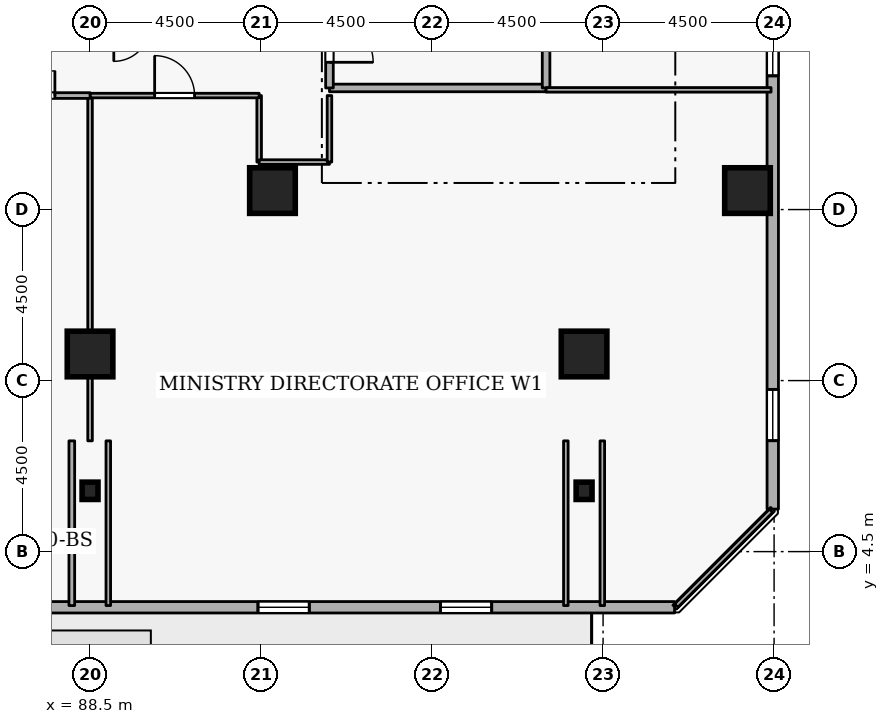
"""IFC4 building model, lengths in metres.
Left out: names, types, materials, properties, quantities, classifications, styles, units other than length and angle.
Written with IfcOpenShell. Run it as: python <this file> out.ifc"""

import sys

from ifc_helpers import new_model, si_unit, direction, frame, frame_2d, origin, origin_2d, place, context, subcontext, project, spatial, rectangle, i_section, extrude, element, fill, save


model = new_model("IFC4")
c1 = context("Model", 3, precision=1e-05, world=origin(), true_north=direction((0.0, 1.0)))
c2 = subcontext(c1, "Body", "Model", "MODEL_VIEW")
j1 = project(units=[si_unit("LENGTHUNIT", "METRE"), si_unit("PLANEANGLEUNIT", "RADIAN")], contexts=[c1])
p1 = place(None, origin())
s1 = spatial("IfcSite", under=j1, at=p1, CompositionType="ELEMENT")
p2 = place(p1, origin())
s2 = spatial("IfcBuilding", under=s1, at=p2, CompositionType="ELEMENT")
p3 = place(p2, frame((0.0, 0.0, 116.1)))
s3 = spatial("IfcBuildingStorey", under=s2, at=p3, CompositionType="ELEMENT", Elevation=116.1)
for number, where, z_axis, x_axis in (
    (1, (105.8, 14.0, 0.0), (0.0, 0.0, 1.0), (1.0, 0.0, 0.0)),
    (2, (101.5, 9.7, 0.0), (0.0, 0.0, 1.0), (1.0, 0.0, 0.0)),
    (3, (88.5, 9.7, 0.0), (0.0, 0.0, 1.0), (1.0, 0.0, 0.0)),
    (4, (93.3, 14.0, 0.0), (0.0, 0.0, 1.0), (1.0, 0.0, 0.0)),
):
    element("IfcColumn", number, at=place(p3, frame(where, z_axis=z_axis, x_axis=x_axis)), inside=s3, PredefinedType="COLUMN", context=c2, shape_type="SweptSolid", body=[
        extrude(rectangle(XDim=1.2, YDim=1.2, at=origin_2d()), origin(), (0.0, 0.0, 1.0), 3.6),
    ])
for number, where, z_axis, x_axis in (
    (5, (101.5, 6.1, 0.0), (0.0, 0.0, 1.0), (1.0, 0.0, 0.0)),
    (6, (88.5, 6.1, 0.0), (0.0, 0.0, 1.0), (1.0, 0.0, 0.0)),
):
    element("IfcColumn", number, at=place(p3, frame(where, z_axis=z_axis, x_axis=x_axis)), inside=s3, PredefinedType="COLUMN", context=c2, shape_type="SweptSolid", body=[
        extrude(i_section(OverallWidth=0.418, OverallDepth=0.456, WebThickness=0.042, FlangeThickness=0.067, FilletRadius=0.015, at=origin_2d()), origin(), (0.0, 0.0, 1.0), 3.6),
    ])
p4 = place(p3, frame((67.119, 3.035, 0.0), z_axis=(0.0, 0.0, 1.0), x_axis=(1.0, 0.0, 0.0)))
e7 = element("IfcWall", 7, at=p4, inside=s3, PredefinedType="STANDARD", context=c2, shape_type="SweptSolid", body=[
    extrude(rectangle(XDim=36.763, YDim=0.3, at=frame_2d((18.381, 0.0))), origin(), (0.0, 0.0, 1.0), 2.22),
])
p5 = place(p4, frame((19.281, 0.0, 0.0)))
e8 = element("IfcOpeningElement", 8, at=p5, cuts=e7, PredefinedType="OPENING", context=c2, shape_type="SweptSolid", body=[
    extrude(rectangle(XDim=1.0, YDim=2.08, at=frame_2d((0.5, 1.04))), frame((0.0, 0.16, 0.0), z_axis=(0.0, -1.0, 0.0), x_axis=(1.0, 0.0, 0.0)), (0.0, 0.0, 1.0), 0.32),
])
p6 = place(p4, frame((1.8, 0.0, 0.72)))
e9 = element("IfcOpeningElement", 9, at=p6, cuts=e7, PredefinedType="OPENING", context=c2, shape_type="SweptSolid", body=[
    extrude(rectangle(XDim=1.35, YDim=1.05, at=frame_2d((0.675, 0.525))), frame((0.0, 0.16, 0.0), z_axis=(0.0, -1.0, 0.0), x_axis=(1.0, 0.0, 0.0)), (0.0, 0.0, 1.0), 0.32),
])
p7 = place(p4, frame((11.4, 0.0, 0.72)))
e10 = element("IfcOpeningElement", 10, at=p7, cuts=e7, PredefinedType="OPENING", context=c2, shape_type="SweptSolid", body=[
    extrude(rectangle(XDim=1.35, YDim=1.05, at=frame_2d((0.675, 0.525))), frame((0.0, 0.16, 0.0), z_axis=(0.0, -1.0, 0.0), x_axis=(1.0, 0.0, 0.0)), (0.0, 0.0, 1.0), 0.32),
])
p8 = place(p4, frame((16.2, 0.0, 0.72)))
e11 = element("IfcOpeningElement", 11, at=p8, cuts=e7, PredefinedType="OPENING", context=c2, shape_type="SweptSolid", body=[
    extrude(rectangle(XDim=1.35, YDim=1.05, at=frame_2d((0.675, 0.525))), frame((0.0, 0.16, 0.0), z_axis=(0.0, -1.0, 0.0), x_axis=(1.0, 0.0, 0.0)), (0.0, 0.0, 1.0), 0.32),
])
p9 = place(p4, frame((25.8, 0.0, 0.72)))
e12 = element("IfcOpeningElement", 12, at=p9, cuts=e7, PredefinedType="OPENING", context=c2, shape_type="SweptSolid", body=[
    extrude(rectangle(XDim=1.35, YDim=1.05, at=frame_2d((0.675, 0.525))), frame((0.0, 0.16, 0.0), z_axis=(0.0, -1.0, 0.0), x_axis=(1.0, 0.0, 0.0)), (0.0, 0.0, 1.0), 0.32),
])
p10 = place(p4, frame((30.6, 0.0, 0.72)))
e13 = element("IfcOpeningElement", 13, at=p10, cuts=e7, PredefinedType="OPENING", context=c2, shape_type="SweptSolid", body=[
    extrude(rectangle(XDim=1.35, YDim=1.05, at=frame_2d((0.675, 0.525))), frame((0.0, 0.16, 0.0), z_axis=(0.0, -1.0, 0.0), x_axis=(1.0, 0.0, 0.0)), (0.0, 0.0, 1.0), 0.32),
])
p11 = place(p3, frame((106.465, 5.619, 0.0), z_axis=(0.0, 0.0, 1.0), x_axis=(0.0, 1.0, 0.0)))
e14 = element("IfcWall", 14, at=p11, inside=s3, PredefinedType="STANDARD", context=c2, shape_type="SweptSolid", body=[
    extrude(rectangle(XDim=36.763, YDim=0.3, at=frame_2d((18.381, 0.0))), origin(), (0.0, 0.0, 1.0), 2.22),
])
p12 = place(p11, frame((1.8, 0.0, 0.72)))
e15 = element("IfcOpeningElement", 15, at=p12, cuts=e14, PredefinedType="OPENING", context=c2, shape_type="SweptSolid", body=[
    extrude(rectangle(XDim=1.35, YDim=1.05, at=frame_2d((0.675, 0.525))), frame((0.0, 0.16, 0.0), z_axis=(0.0, -1.0, 0.0), x_axis=(1.0, 0.0, 0.0)), (0.0, 0.0, 1.0), 0.32),
])
p13 = place(p11, frame((11.4, 0.0, 0.72)))
e16 = element("IfcOpeningElement", 16, at=p13, cuts=e14, PredefinedType="OPENING", context=c2, shape_type="SweptSolid", body=[
    extrude(rectangle(XDim=1.35, YDim=1.05, at=frame_2d((0.675, 0.525))), frame((0.0, 0.16, 0.0), z_axis=(0.0, -1.0, 0.0), x_axis=(1.0, 0.0, 0.0)), (0.0, 0.0, 1.0), 0.32),
])
p14 = place(p11, frame((16.2, 0.0, 0.72)))
e17 = element("IfcOpeningElement", 17, at=p14, cuts=e14, PredefinedType="OPENING", context=c2, shape_type="SweptSolid", body=[
    extrude(rectangle(XDim=1.35, YDim=1.05, at=frame_2d((0.675, 0.525))), frame((0.0, 0.16, 0.0), z_axis=(0.0, -1.0, 0.0), x_axis=(1.0, 0.0, 0.0)), (0.0, 0.0, 1.0), 0.32),
])
p15 = place(p11, frame((25.8, 0.0, 0.72)))
e18 = element("IfcOpeningElement", 18, at=p15, cuts=e14, PredefinedType="OPENING", context=c2, shape_type="SweptSolid", body=[
    extrude(rectangle(XDim=1.35, YDim=1.05, at=frame_2d((0.675, 0.525))), frame((0.0, 0.16, 0.0), z_axis=(0.0, -1.0, 0.0), x_axis=(1.0, 0.0, 0.0)), (0.0, 0.0, 1.0), 0.32),
])
p16 = place(p11, frame((30.6, 0.0, 0.72)))
e19 = element("IfcOpeningElement", 19, at=p16, cuts=e14, PredefinedType="OPENING", context=c2, shape_type="SweptSolid", body=[
    extrude(rectangle(XDim=1.35, YDim=1.05, at=frame_2d((0.675, 0.525))), frame((0.0, 0.16, 0.0), z_axis=(0.0, -1.0, 0.0), x_axis=(1.0, 0.0, 0.0)), (0.0, 0.0, 1.0), 0.32),
])
p17 = place(p3, frame((94.8, 16.7, 0.0), z_axis=(0.0, 0.0, 1.0), x_axis=(1.0, 0.0, 0.0)))
e20 = element("IfcWall", 20, at=p17, inside=s3, PredefinedType="STANDARD", context=c2, shape_type="SweptSolid", body=[
    extrude(rectangle(XDim=5.7, YDim=0.2, at=frame_2d((2.85, 0.0))), origin(), (0.0, 0.0, 1.0), 3.32),
])
p18 = place(p3, frame((100.5, 16.7, 0.0), z_axis=(0.0, 0.0, 1.0), x_axis=(0.0, 1.0, 0.0)))
e21 = element("IfcWall", 21, at=p18, inside=s3, PredefinedType="STANDARD", context=c2, shape_type="SweptSolid", body=[
    extrude(rectangle(XDim=2.5, YDim=0.2, at=frame_2d((1.25, 0.0))), origin(), (0.0, 0.0, 1.0), 3.32),
])
p19 = place(p3, frame((94.8, 19.2, 0.0), z_axis=(0.0, 0.0, 1.0), x_axis=(0.0, -1.0, 0.0)))
e22 = element("IfcWall", 22, at=p19, inside=s3, PredefinedType="STANDARD", context=c2, shape_type="SweptSolid", body=[
    extrude(rectangle(XDim=2.5, YDim=0.2, at=frame_2d((1.25, 0.0))), origin(), (0.0, 0.0, 1.0), 3.32),
])
p20 = place(p19, frame((0.675, 0.0, 0.0)))
e23 = element("IfcOpeningElement", 23, at=p20, cuts=e22, PredefinedType="OPENING", context=c2, shape_type="SweptSolid", body=[
    extrude(rectangle(XDim=1.15, YDim=2.1, at=frame_2d((0.575, 1.05))), frame((0.0, 0.11, 0.0), z_axis=(0.0, -1.0, 0.0), x_axis=(1.0, 0.0, 0.0)), (0.0, 0.0, 1.0), 0.22),
])
p21 = place(p3, frame((92.95, 16.5, 0.0), z_axis=(0.0, 0.0, 1.0), x_axis=(0.0, -1.0, 0.0)))
e24 = element("IfcWall", 24, at=p21, inside=s3, PredefinedType="PARTITIONING", context=c2, shape_type="SweptSolid", body=[
    extrude(rectangle(XDim=1.75, YDim=0.12, at=frame_2d((0.875, 0.0))), origin(), (0.0, 0.0, 1.0), 3.32),
])
p22 = place(p3, frame((92.95, 14.75, 0.0), z_axis=(0.0, 0.0, 1.0), x_axis=(1.0, 0.0, 0.0)))
e25 = element("IfcWall", 25, at=p22, inside=s3, PredefinedType="PARTITIONING", context=c2, shape_type="SweptSolid", body=[
    extrude(rectangle(XDim=1.85, YDim=0.12, at=frame_2d((0.925, 0.0))), origin(), (0.0, 0.0, 1.0), 3.32),
])
p23 = place(p3, frame((94.8, 14.75, 0.0), z_axis=(0.0, 0.0, 1.0), x_axis=(0.0, 1.0, 0.0)))
e26 = element("IfcWall", 26, at=p23, inside=s3, PredefinedType="PARTITIONING", context=c2, shape_type="SweptSolid", body=[
    extrude(rectangle(XDim=1.75, YDim=0.12, at=frame_2d((0.875, 0.0))), origin(), (0.0, 0.0, 1.0), 3.32),
])
p24 = place(p3, frame((100.5, 16.65, 0.0), z_axis=(0.0, 0.0, 1.0), x_axis=(1.0, 0.0, 0.0)))
e27 = element("IfcWall", 27, at=p24, inside=s3, PredefinedType="PARTITIONING", context=c2, shape_type="SweptSolid", body=[
    extrude(rectangle(XDim=5.92, YDim=0.12, at=frame_2d((2.96, 0.0))), origin(), (0.0, 0.0, 1.0), 3.32),
])
p25 = place(p3, frame((106.42, 5.575, 0.0), z_axis=(0.0, 0.0, 1.0), x_axis=(-0.707106781187, -0.707106781187, 0.0)))
e28 = element("IfcWall", 28, at=p25, inside=s3, PredefinedType="PARTITIONING", context=c2, shape_type="SweptSolid", body=[
    extrude(rectangle(XDim=3.528, YDim=0.12, at=frame_2d((1.764, 0.0))), origin(), (0.0, 0.0, 1.0), 3.32),
])
for number, where, z_axis, x_axis in (
    (29, (101.98, 3.08, 0.0), (0.0, 0.0, 1.0), (0.0, 1.0, 0.0)),
    (30, (101.02, 7.414, 0.0), (0.0, 0.0, 1.0), (0.0, -1.0, 0.0)),
    (31, (88.98, 3.08, 0.0), (0.0, 0.0, 1.0), (0.0, 1.0, 0.0)),
):
    element("IfcWall", number, at=place(p3, frame(where, z_axis=z_axis, x_axis=x_axis)), inside=s3, PredefinedType="PARTITIONING", context=c2, shape_type="SweptSolid", body=[
        extrude(rectangle(XDim=4.334, YDim=0.12, at=frame_2d((2.167, 0.0))), origin(), (0.0, 0.0, 1.0), 1.685),
    ])
p26 = place(p3, frame((88.5, 7.414, 0.0), z_axis=(0.0, 0.0, 1.0), x_axis=(0.0, 1.0, 0.0)))
e32 = element("IfcWall", 32, at=p26, inside=s3, PredefinedType="PARTITIONING", context=c2, shape_type="SweptSolid", body=[
    extrude(rectangle(XDim=9.086, YDim=0.12, at=frame_2d((4.543, 0.0))), origin(), (0.0, 0.0, 1.0), 1.685),
])
p27 = place(p3, frame((88.5, 16.5, 0.0), z_axis=(0.0, 0.0, 1.0), x_axis=(1.0, 0.0, 0.0)))
e33 = element("IfcWall", 33, at=p27, inside=s3, PredefinedType="PARTITIONING", context=c2, shape_type="SweptSolid", body=[
    extrude(rectangle(XDim=4.45, YDim=0.12, at=frame_2d((2.225, 0.0))), origin(), (0.0, 0.0, 1.0), 3.32),
])
p28 = place(p27, frame((1.7, 0.0, 0.0)))
e34 = element("IfcOpeningElement", 34, at=p28, cuts=e33, PredefinedType="OPENING", context=c2, shape_type="SweptSolid", body=[
    extrude(rectangle(XDim=1.05, YDim=2.1, at=frame_2d((0.525, 1.05))), frame((0.0, 0.07, 0.0), z_axis=(0.0, -1.0, 0.0), x_axis=(1.0, 0.0, 0.0)), (0.0, 0.0, 1.0), 0.14),
])
p29 = place(p3, frame((88.02, 7.414, 0.0), z_axis=(0.0, 0.0, 1.0), x_axis=(0.0, -1.0, 0.0)))
e35 = element("IfcWall", 35, at=p29, inside=s3, PredefinedType="PARTITIONING", context=c2, shape_type="SweptSolid", body=[
    extrude(rectangle(XDim=4.334, YDim=0.15, at=frame_2d((2.167, 0.0))), origin(), (0.0, 0.0, 1.0), 1.685),
])
p30 = place(p3, frame((85.35, 16.5, 0.0), z_axis=(0.0, 0.0, 1.0), x_axis=(1.0, 0.0, 0.0)))
e36 = element("IfcWall", 36, at=p30, inside=s3, PredefinedType="PARTITIONING", context=c2, shape_type="SweptSolid", body=[
    extrude(rectangle(XDim=3.15, YDim=0.15, at=frame_2d((1.575, 0.0))), origin(), (0.0, 0.0, 1.0), 3.32),
])
p31 = place(p30, frame((0.925, 0.0, 0.0)))
e37 = element("IfcOpeningElement", 37, at=p31, cuts=e36, PredefinedType="OPENING", context=c2, shape_type="SweptSolid", body=[
    extrude(rectangle(XDim=1.3, YDim=2.12, at=frame_2d((0.65, 1.06))), frame((0.0, 0.085, 0.0), z_axis=(0.0, -1.0, 0.0), x_axis=(1.0, 0.0, 0.0)), (0.0, 0.0, 1.0), 0.17),
])
p32 = place(p9, origin())
e38 = element("IfcWindow", 38, at=p32, inside=s3, PartitioningType="SINGLE_PANEL", PredefinedType="WINDOW", context=c2, shape_type="SweptSolid", body=[
    extrude(rectangle(XDim=1.35, YDim=1.05, at=frame_2d((0.675, 0.525))), frame((0.0, 0.03, 0.0), z_axis=(0.0, -1.0, 0.0), x_axis=(1.0, 0.0, 0.0)), (0.0, 0.0, 1.0), 0.06),
])
fill(e12, e38)
p33 = place(p10, origin())
e39 = element("IfcWindow", 39, at=p33, inside=s3, PartitioningType="SINGLE_PANEL", PredefinedType="WINDOW", context=c2, shape_type="SweptSolid", body=[
    extrude(rectangle(XDim=1.35, YDim=1.05, at=frame_2d((0.675, 0.525))), frame((0.0, 0.03, 0.0), z_axis=(0.0, -1.0, 0.0), x_axis=(1.0, 0.0, 0.0)), (0.0, 0.0, 1.0), 0.06),
])
fill(e13, e39)
p34 = place(p12, origin())
e40 = element("IfcWindow", 40, at=p34, inside=s3, PartitioningType="SINGLE_PANEL", PredefinedType="WINDOW", context=c2, shape_type="SweptSolid", body=[
    extrude(rectangle(XDim=1.35, YDim=1.05, at=frame_2d((0.675, 0.525))), frame((0.0, 0.03, 0.0), z_axis=(0.0, -1.0, 0.0), x_axis=(1.0, 0.0, 0.0)), (0.0, 0.0, 1.0), 0.06),
])
fill(e15, e40)
p35 = place(p13, origin())
e41 = element("IfcWindow", 41, at=p35, inside=s3, PartitioningType="SINGLE_PANEL", PredefinedType="WINDOW", context=c2, shape_type="SweptSolid", body=[
    extrude(rectangle(XDim=1.35, YDim=1.05, at=frame_2d((0.675, 0.525))), frame((0.0, 0.03, 0.0), z_axis=(0.0, -1.0, 0.0), x_axis=(1.0, 0.0, 0.0)), (0.0, 0.0, 1.0), 0.06),
])
fill(e16, e41)
p36 = place(p20, origin())
e42 = element("IfcDoor", 42, at=p36, inside=s3, OperationType="SINGLE_SWING_RIGHT", PredefinedType="DOOR", context=c2, shape_type="SweptSolid", body=[
    extrude(rectangle(XDim=1.15, YDim=2.1, at=frame_2d((0.575, 1.05))), frame((0.0, 0.025, 0.0), z_axis=(0.0, -1.0, 0.0), x_axis=(1.0, 0.0, 0.0)), (0.0, 0.0, 1.0), 0.05),
])
fill(e23, e42)
p37 = place(p28, origin())
e43 = element("IfcDoor", 43, at=p37, inside=s3, OperationType="SINGLE_SWING_LEFT", PredefinedType="DOOR", context=c2, shape_type="SweptSolid", body=[
    extrude(rectangle(XDim=1.05, YDim=2.1, at=frame_2d((0.525, 1.05))), frame((0.0, 0.025, 0.0), z_axis=(0.0, -1.0, 0.0), x_axis=(1.0, 0.0, 0.0)), (0.0, 0.0, 1.0), 0.05),
])
fill(e34, e43)
p38 = place(p31, origin())
e44 = element("IfcDoor", 44, at=p38, inside=s3, OperationType="DOUBLE_DOOR_SINGLE_SWING", PredefinedType="DOOR", context=c2, shape_type="SweptSolid", body=[
    extrude(rectangle(XDim=1.3, YDim=2.12, at=frame_2d((0.65, 1.06))), frame((0.0, 0.025, 0.0), z_axis=(0.0, -1.0, 0.0), x_axis=(1.0, 0.0, 0.0)), (0.0, 0.0, 1.0), 0.05),
])
fill(e37, e44)
save(model, sys.argv[1])
